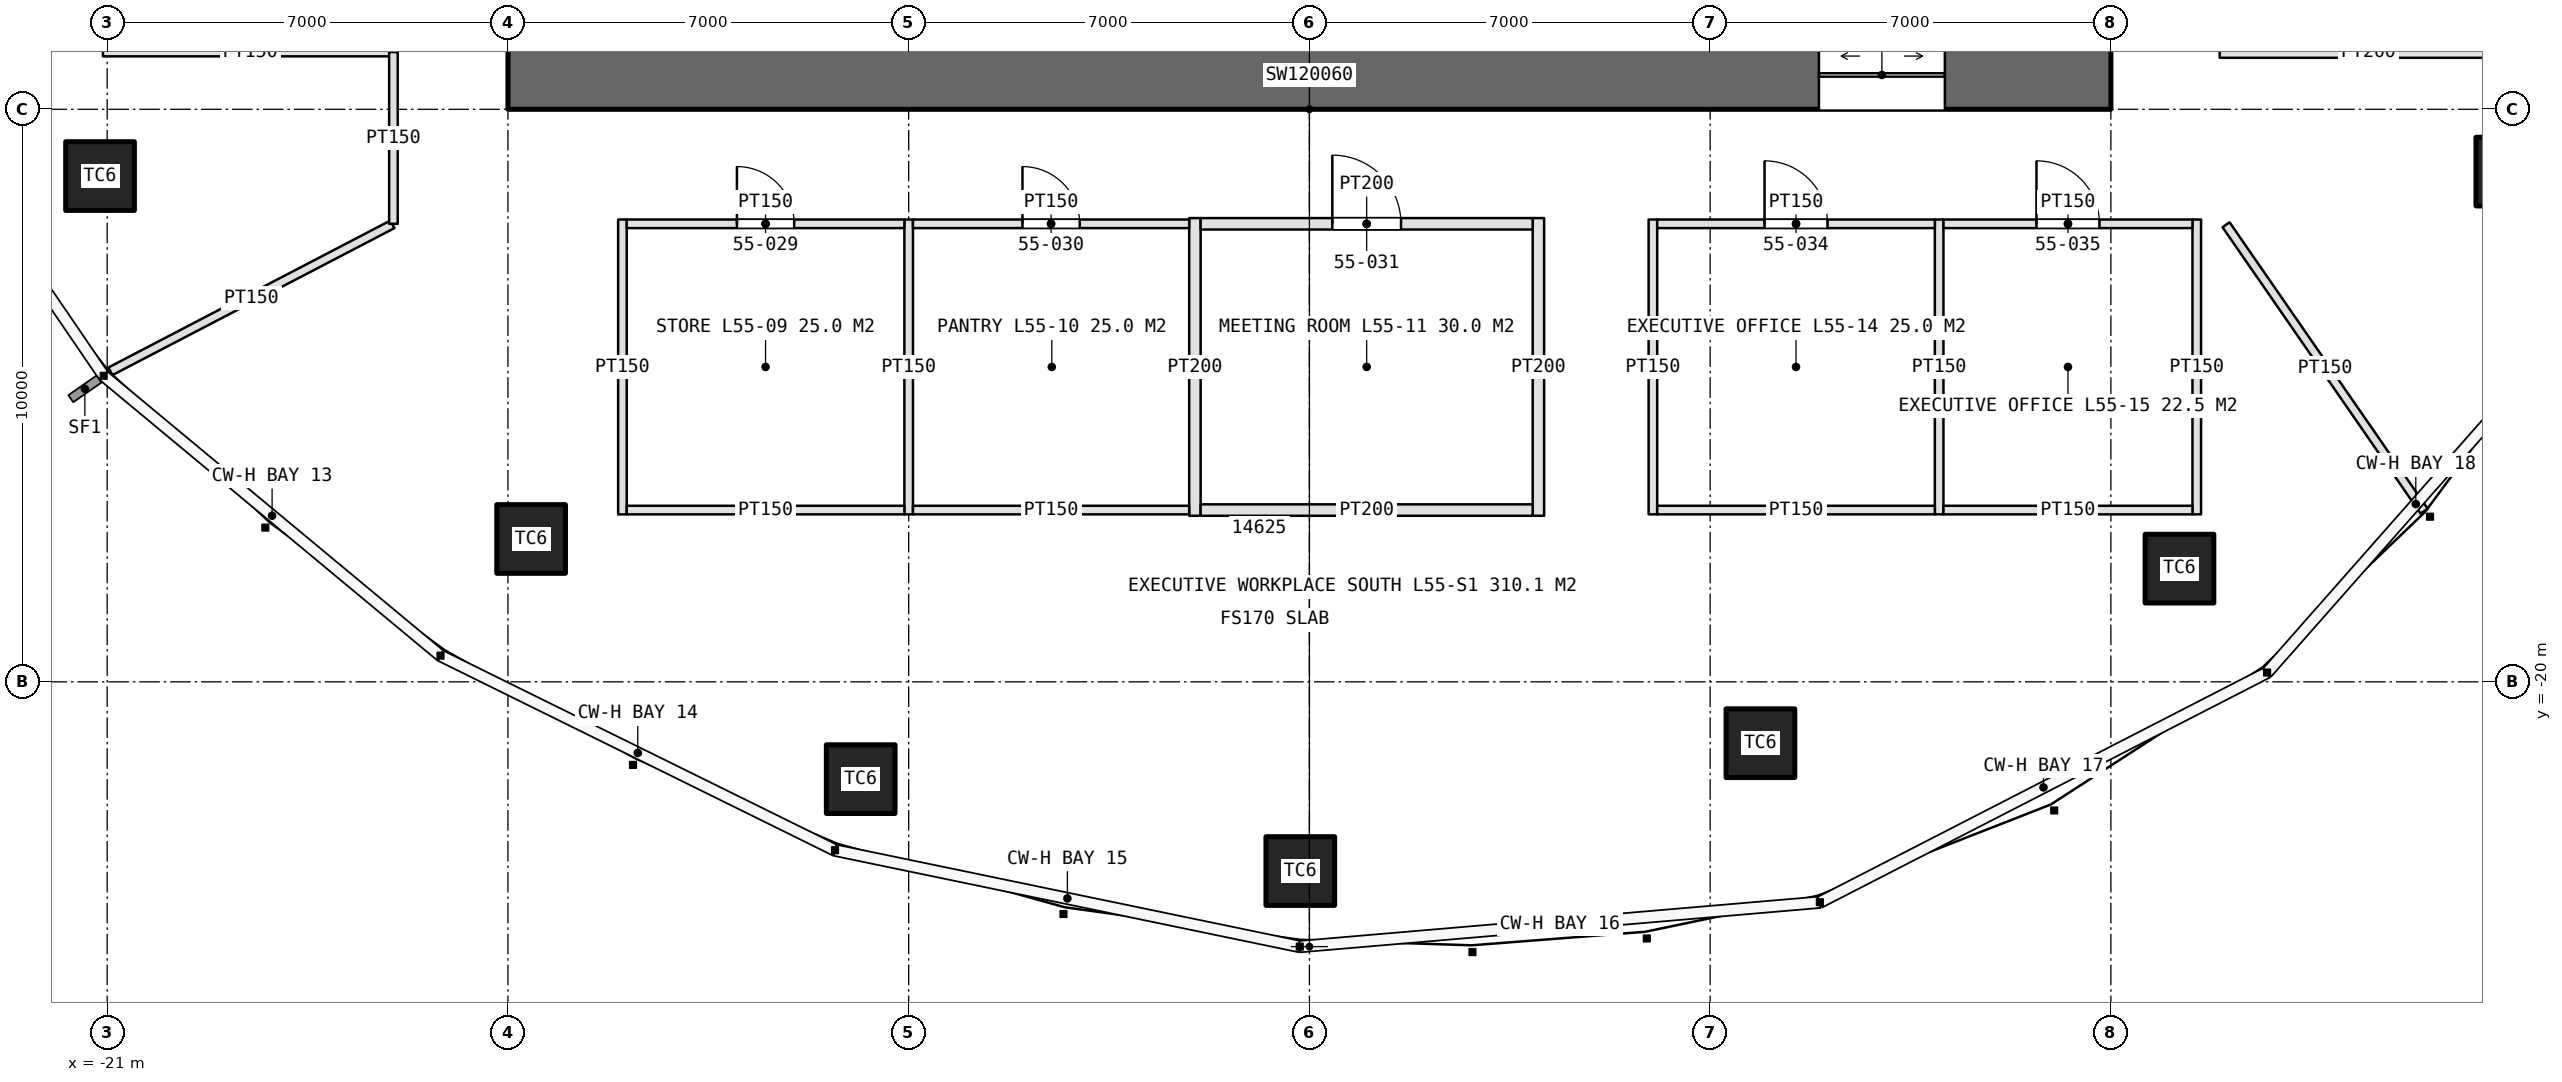
"""IFC4 building model, lengths in metres.
Left out: names, types, materials, properties, quantities, classifications, styles, units other than length and angle.
Written with IfcOpenShell. Run it as: python <this file> out.ifc"""

import sys

from ifc_helpers import new_model, si_unit, direction, frame, frame_2d, origin, origin_2d, place, context, subcontext, project, spatial, rectangle, extrude, element, fill, save


model = new_model("IFC4")
c1 = context("Model", 3, precision=1e-05, world=origin(), true_north=direction((0.0, 1.0)))
c2 = subcontext(c1, "Body", "Model", "MODEL_VIEW")
j1 = project(units=[si_unit("LENGTHUNIT", "METRE"), si_unit("PLANEANGLEUNIT", "RADIAN")], contexts=[c1])
p1 = place(None, origin())
s1 = spatial("IfcSite", under=j1, at=p1, CompositionType="ELEMENT")
p2 = place(p1, origin())
s2 = spatial("IfcBuilding", under=s1, at=p2, CompositionType="ELEMENT")
p3 = place(p2, frame((0.0, 0.0, 249.4)))
s3 = spatial("IfcBuildingStorey", under=s2, at=p3, CompositionType="ELEMENT", Elevation=249.4)
p4 = place(p3, frame((-14.0, -9.4, 0.0), z_axis=(0.0, 0.0, 1.0), x_axis=(1.0, 0.0, 0.0)))
e1 = element("IfcWall", 1, at=p4, inside=s3, PredefinedType="SHEAR", context=c2, shape_type="SweptSolid", body=[
    extrude(rectangle(XDim=28.0, YDim=1.2, at=frame_2d((14.0, 0.0))), origin(), (0.0, 0.0, 1.0), 4.2),
])
p5 = place(p4, frame((22.9, 0.0, 0.0)))
e2 = element("IfcOpeningElement", 2, at=p5, cuts=e1, PredefinedType="OPENING", context=c2, shape_type="SweptSolid", body=[
    extrude(rectangle(XDim=2.2, YDim=2.7, at=frame_2d((1.1, 1.35))), frame((0.0, 0.61, 0.0), z_axis=(0.0, -1.0, 0.0), x_axis=(1.0, 0.0, 0.0)), (0.0, 0.0, 1.0), 1.22),
])
for number, where, z_axis, x_axis in (
    (3, (-21.125, -11.166, 0.0), (0.0, 0.0, 1.0), (1.0, 0.0, 0.0)),
    (4, (-13.595, -17.505, 0.0), (0.0, 0.0, 1.0), (1.0, 0.0, 0.0)),
    (5, (-7.838, -21.7, 0.0), (0.0, 0.0, 1.0), (1.0, 0.0, 0.0)),
    (6, (-0.159, -23.305, 0.0), (0.0, 0.0, 1.0), (1.0, 0.0, 0.0)),
    (7, (7.878, -21.072, 0.0), (0.0, 0.0, 1.0), (1.0, 0.0, 0.0)),
    (8, (15.198, -18.023, 0.0), (0.0, 0.0, 1.0), (1.0, 0.0, 0.0)),
    (9, (20.977, -11.088, 0.0), (0.0, 0.0, 1.0), (1.0, 0.0, 0.0)),
):
    element("IfcColumn", number, at=place(p3, frame(where, z_axis=z_axis, x_axis=x_axis)), inside=s3, PredefinedType="COLUMN", context=c2, shape_type="SweptSolid", body=[
        extrude(rectangle(XDim=1.2, YDim=1.2, at=origin_2d()), origin(), (0.0, 0.0, 1.0), 4.2),
    ])
p6 = place(p3, frame((15.9, -9.0, 0.0), z_axis=(0.0, 0.0, 1.0), x_axis=(1.0, 0.0, 0.0)))
e10 = element("IfcWall", 10, at=p6, inside=s3, PredefinedType="PARTITIONING", context=c2, shape_type="SweptSolid", body=[
    extrude(rectangle(XDim=5.2, YDim=0.2, at=frame_2d((2.6, 0.0))), origin(), (0.0, 0.0, 1.0), 3.0),
])
for number, where, z_axis, x_axis in (
    (11, (-12.0, -11.925, 0.0), (0.0, 0.0, 1.0), (0.0, -1.0, 0.0)),
    (12, (-7.0, -11.925, 0.0), (0.0, 0.0, 1.0), (0.0, -1.0, 0.0)),
):
    element("IfcWall", number, at=place(p3, frame(where, z_axis=z_axis, x_axis=x_axis)), inside=s3, PredefinedType="PARTITIONING", context=c2, shape_type="SweptSolid", body=[
        extrude(rectangle(XDim=5.15, YDim=0.15, at=frame_2d((2.575, 0.0))), origin(), (0.0, 0.0, 1.0), 3.0),
    ])
for number, where, z_axis, x_axis in (
    (13, (-2.0, -11.9, 0.0), (0.0, 0.0, 1.0), (0.0, -1.0, 0.0)),
    (14, (4.0, -11.9, 0.0), (0.0, 0.0, 1.0), (0.0, -1.0, 0.0)),
):
    element("IfcWall", number, at=place(p3, frame(where, z_axis=z_axis, x_axis=x_axis)), inside=s3, PredefinedType="PARTITIONING", context=c2, shape_type="SweptSolid", body=[
        extrude(rectangle(XDim=5.2, YDim=0.2, at=frame_2d((2.6, 0.0))), origin(), (0.0, 0.0, 1.0), 3.0),
    ])
p7 = place(p3, frame((-11.925, -12.0, 0.0), z_axis=(0.0, 0.0, 1.0), x_axis=(1.0, 0.0, 0.0)))
e15 = element("IfcWall", 15, at=p7, inside=s3, PredefinedType="PARTITIONING", context=c2, shape_type="SweptSolid", body=[
    extrude(rectangle(XDim=4.85, YDim=0.15, at=frame_2d((2.425, 0.0))), origin(), (0.0, 0.0, 1.0), 3.0),
])
p8 = place(p7, frame((1.925, 0.0, 0.0)))
e16 = element("IfcOpeningElement", 16, at=p8, cuts=e15, PredefinedType="OPENING", context=c2, shape_type="SweptSolid", body=[
    extrude(rectangle(XDim=1.0, YDim=2.2, at=frame_2d((0.5, 1.1))), frame((0.0, 0.085, 0.0), z_axis=(0.0, -1.0, 0.0), x_axis=(1.0, 0.0, 0.0)), (0.0, 0.0, 1.0), 0.17),
])
p9 = place(p3, frame((-11.925, -17.0, 0.0), z_axis=(0.0, 0.0, 1.0), x_axis=(1.0, 0.0, 0.0)))
e17 = element("IfcWall", 17, at=p9, inside=s3, PredefinedType="PARTITIONING", context=c2, shape_type="SweptSolid", body=[
    extrude(rectangle(XDim=4.85, YDim=0.15, at=frame_2d((2.425, 0.0))), origin(), (0.0, 0.0, 1.0), 3.0),
])
p10 = place(p3, frame((-6.925, -12.0, 0.0), z_axis=(0.0, 0.0, 1.0), x_axis=(1.0, 0.0, 0.0)))
e18 = element("IfcWall", 18, at=p10, inside=s3, PredefinedType="PARTITIONING", context=c2, shape_type="SweptSolid", body=[
    extrude(rectangle(XDim=4.825, YDim=0.15, at=frame_2d((2.413, 0.0))), origin(), (0.0, 0.0, 1.0), 3.0),
])
p11 = place(p10, frame((1.913, 0.0, 0.0)))
e19 = element("IfcOpeningElement", 19, at=p11, cuts=e18, PredefinedType="OPENING", context=c2, shape_type="SweptSolid", body=[
    extrude(rectangle(XDim=1.0, YDim=2.2, at=frame_2d((0.5, 1.1))), frame((0.0, 0.085, 0.0), z_axis=(0.0, -1.0, 0.0), x_axis=(1.0, 0.0, 0.0)), (0.0, 0.0, 1.0), 0.17),
])
p12 = place(p3, frame((-6.925, -17.0, 0.0), z_axis=(0.0, 0.0, 1.0), x_axis=(1.0, 0.0, 0.0)))
e20 = element("IfcWall", 20, at=p12, inside=s3, PredefinedType="PARTITIONING", context=c2, shape_type="SweptSolid", body=[
    extrude(rectangle(XDim=4.825, YDim=0.15, at=frame_2d((2.413, 0.0))), origin(), (0.0, 0.0, 1.0), 3.0),
])
p13 = place(p3, frame((-1.9, -12.0, 0.0), z_axis=(0.0, 0.0, 1.0), x_axis=(1.0, 0.0, 0.0)))
e21 = element("IfcWall", 21, at=p13, inside=s3, PredefinedType="PARTITIONING", context=c2, shape_type="SweptSolid", body=[
    extrude(rectangle(XDim=5.8, YDim=0.2, at=frame_2d((2.9, 0.0))), origin(), (0.0, 0.0, 1.0), 3.0),
])
p14 = place(p13, frame((2.3, 0.0, 0.0)))
e22 = element("IfcOpeningElement", 22, at=p14, cuts=e21, PredefinedType="OPENING", context=c2, shape_type="SweptSolid", body=[
    extrude(rectangle(XDim=1.2, YDim=2.4, at=frame_2d((0.6, 1.2))), frame((0.0, 0.11, 0.0), z_axis=(0.0, -1.0, 0.0), x_axis=(1.0, 0.0, 0.0)), (0.0, 0.0, 1.0), 0.22),
])
p15 = place(p3, frame((-1.9, -17.0, 0.0), z_axis=(0.0, 0.0, 1.0), x_axis=(1.0, 0.0, 0.0)))
e23 = element("IfcWall", 23, at=p15, inside=s3, PredefinedType="PARTITIONING", context=c2, shape_type="SweptSolid", body=[
    extrude(rectangle(XDim=5.8, YDim=0.2, at=frame_2d((2.9, 0.0))), origin(), (0.0, 0.0, 1.0), 3.0),
])
for number, where, z_axis, x_axis in (
    (24, (-15.925, -9.0, 0.0), (0.0, 0.0, 1.0), (-1.0, 0.0, 0.0)),
    (25, (6.0, -11.925, 0.0), (0.0, 0.0, 1.0), (0.0, -1.0, 0.0)),
    (26, (11.0, -11.925, 0.0), (0.0, 0.0, 1.0), (0.0, -1.0, 0.0)),
    (27, (15.5, -11.925, 0.0), (0.0, 0.0, 1.0), (0.0, -1.0, 0.0)),
):
    element("IfcWall", number, at=place(p3, frame(where, z_axis=z_axis, x_axis=x_axis)), inside=s3, PredefinedType="PARTITIONING", context=c2, shape_type="SweptSolid", body=[
        extrude(rectangle(XDim=5.15, YDim=0.15, at=frame_2d((2.575, 0.0))), origin(), (0.0, 0.0, 1.0), 3.0),
    ])
p16 = place(p3, frame((6.075, -12.0, 0.0), z_axis=(0.0, 0.0, 1.0), x_axis=(1.0, 0.0, 0.0)))
e28 = element("IfcWall", 28, at=p16, inside=s3, PredefinedType="PARTITIONING", context=c2, shape_type="SweptSolid", body=[
    extrude(rectangle(XDim=4.85, YDim=0.15, at=frame_2d((2.425, 0.0))), origin(), (0.0, 0.0, 1.0), 3.0),
])
p17 = place(p16, frame((1.875, 0.0, 0.0)))
e29 = element("IfcOpeningElement", 29, at=p17, cuts=e28, PredefinedType="OPENING", context=c2, shape_type="SweptSolid", body=[
    extrude(rectangle(XDim=1.1, YDim=2.3, at=frame_2d((0.55, 1.15))), frame((0.0, 0.085, 0.0), z_axis=(0.0, -1.0, 0.0), x_axis=(1.0, 0.0, 0.0)), (0.0, 0.0, 1.0), 0.17),
])
p18 = place(p3, frame((6.075, -17.0, 0.0), z_axis=(0.0, 0.0, 1.0), x_axis=(1.0, 0.0, 0.0)))
e30 = element("IfcWall", 30, at=p18, inside=s3, PredefinedType="PARTITIONING", context=c2, shape_type="SweptSolid", body=[
    extrude(rectangle(XDim=4.85, YDim=0.15, at=frame_2d((2.425, 0.0))), origin(), (0.0, 0.0, 1.0), 3.0),
])
p19 = place(p3, frame((11.075, -12.0, 0.0), z_axis=(0.0, 0.0, 1.0), x_axis=(1.0, 0.0, 0.0)))
e31 = element("IfcWall", 31, at=p19, inside=s3, PredefinedType="PARTITIONING", context=c2, shape_type="SweptSolid", body=[
    extrude(rectangle(XDim=4.35, YDim=0.15, at=frame_2d((2.175, 0.0))), origin(), (0.0, 0.0, 1.0), 3.0),
])
p20 = place(p19, frame((1.625, 0.0, 0.0)))
e32 = element("IfcOpeningElement", 32, at=p20, cuts=e31, PredefinedType="OPENING", context=c2, shape_type="SweptSolid", body=[
    extrude(rectangle(XDim=1.1, YDim=2.3, at=frame_2d((0.55, 1.15))), frame((0.0, 0.085, 0.0), z_axis=(0.0, -1.0, 0.0), x_axis=(1.0, 0.0, 0.0)), (0.0, 0.0, 1.0), 0.17),
])
p21 = place(p3, frame((11.075, -17.0, 0.0), z_axis=(0.0, 0.0, 1.0), x_axis=(1.0, 0.0, 0.0)))
e33 = element("IfcWall", 33, at=p21, inside=s3, PredefinedType="PARTITIONING", context=c2, shape_type="SweptSolid", body=[
    extrude(rectangle(XDim=4.35, YDim=0.15, at=frame_2d((2.175, 0.0))), origin(), (0.0, 0.0, 1.0), 3.0),
])
p22 = place(p3, frame((-16.018, -12.009, 0.0), z_axis=(0.0, 0.0, 1.0), x_axis=(-0.886831549241, -0.462092851351, 0.0)))
e34 = element("IfcWall", 34, at=p22, inside=s3, PredefinedType="PARTITIONING", context=c2, shape_type="SweptSolid", body=[
    extrude(rectangle(XDim=5.555, YDim=0.15, at=frame_2d((2.778, 0.0))), origin(), (0.0, 0.0, 1.0), 3.0),
])
p23 = place(p3, frame((16.011, -12.016, 0.0), z_axis=(0.0, 0.0, 1.0), x_axis=(0.568863489071, -0.822431961199, 0.0)))
e35 = element("IfcWall", 35, at=p23, inside=s3, PredefinedType="PARTITIONING", context=c2, shape_type="SweptSolid", body=[
    extrude(rectangle(XDim=6.083, YDim=0.15, at=frame_2d((3.042, 0.0))), origin(), (0.0, 0.0, 1.0), 3.0),
])
p24 = place(p3, frame((-16.0, -9.0, 0.0), z_axis=(0.0, 0.0, 1.0), x_axis=(0.0, -1.0, 0.0)))
e36 = element("IfcWall", 36, at=p24, inside=s3, PredefinedType="PARTITIONING", context=c2, shape_type="SweptSolid", body=[
    extrude(rectangle(XDim=3.0, YDim=0.15, at=frame_2d((1.5, 0.0))), origin(), (0.0, 0.0, 1.0), 3.0),
])
p25 = place(p5, origin())
e37 = element("IfcDoor", 37, at=p25, inside=s3, OperationType="DOUBLE_DOOR_SLIDING", PredefinedType="DOOR", context=c2, shape_type="SweptSolid", body=[
    extrude(rectangle(XDim=2.2, YDim=2.7, at=frame_2d((1.1, 1.35))), frame((0.0, 0.025, 0.0), z_axis=(0.0, -1.0, 0.0), x_axis=(1.0, 0.0, 0.0)), (0.0, 0.0, 1.0), 0.05),
])
fill(e2, e37)
p26 = place(p8, origin())
e38 = element("IfcDoor", 38, at=p26, inside=s3, OperationType="SINGLE_SWING_LEFT", PredefinedType="DOOR", context=c2, shape_type="SweptSolid", body=[
    extrude(rectangle(XDim=1.0, YDim=2.2, at=frame_2d((0.5, 1.1))), frame((0.0, 0.025, 0.0), z_axis=(0.0, -1.0, 0.0), x_axis=(1.0, 0.0, 0.0)), (0.0, 0.0, 1.0), 0.05),
])
fill(e16, e38)
p27 = place(p11, origin())
e39 = element("IfcDoor", 39, at=p27, inside=s3, OperationType="SINGLE_SWING_LEFT", PredefinedType="DOOR", context=c2, shape_type="SweptSolid", body=[
    extrude(rectangle(XDim=1.0, YDim=2.2, at=frame_2d((0.5, 1.1))), frame((0.0, 0.025, 0.0), z_axis=(0.0, -1.0, 0.0), x_axis=(1.0, 0.0, 0.0)), (0.0, 0.0, 1.0), 0.05),
])
fill(e19, e39)
p28 = place(p14, origin())
e40 = element("IfcDoor", 40, at=p28, inside=s3, OperationType="SINGLE_SWING_LEFT", PredefinedType="DOOR", context=c2, shape_type="SweptSolid", body=[
    extrude(rectangle(XDim=1.2, YDim=2.4, at=frame_2d((0.6, 1.2))), frame((0.0, 0.025, 0.0), z_axis=(0.0, -1.0, 0.0), x_axis=(1.0, 0.0, 0.0)), (0.0, 0.0, 1.0), 0.05),
])
fill(e22, e40)
p29 = place(p17, origin())
e41 = element("IfcDoor", 41, at=p29, inside=s3, OperationType="SINGLE_SWING_LEFT", PredefinedType="DOOR", context=c2, shape_type="SweptSolid", body=[
    extrude(rectangle(XDim=1.1, YDim=2.3, at=frame_2d((0.55, 1.15))), frame((0.0, 0.025, 0.0), z_axis=(0.0, -1.0, 0.0), x_axis=(1.0, 0.0, 0.0)), (0.0, 0.0, 1.0), 0.05),
])
fill(e29, e41)
p30 = place(p20, origin())
e42 = element("IfcDoor", 42, at=p30, inside=s3, OperationType="SINGLE_SWING_LEFT", PredefinedType="DOOR", context=c2, shape_type="SweptSolid", body=[
    extrude(rectangle(XDim=1.1, YDim=2.3, at=frame_2d((0.55, 1.15))), frame((0.0, 0.025, 0.0), z_axis=(0.0, -1.0, 0.0), x_axis=(1.0, 0.0, 0.0)), (0.0, 0.0, 1.0), 0.05),
])
fill(e32, e42)
save(model, sys.argv[1])
